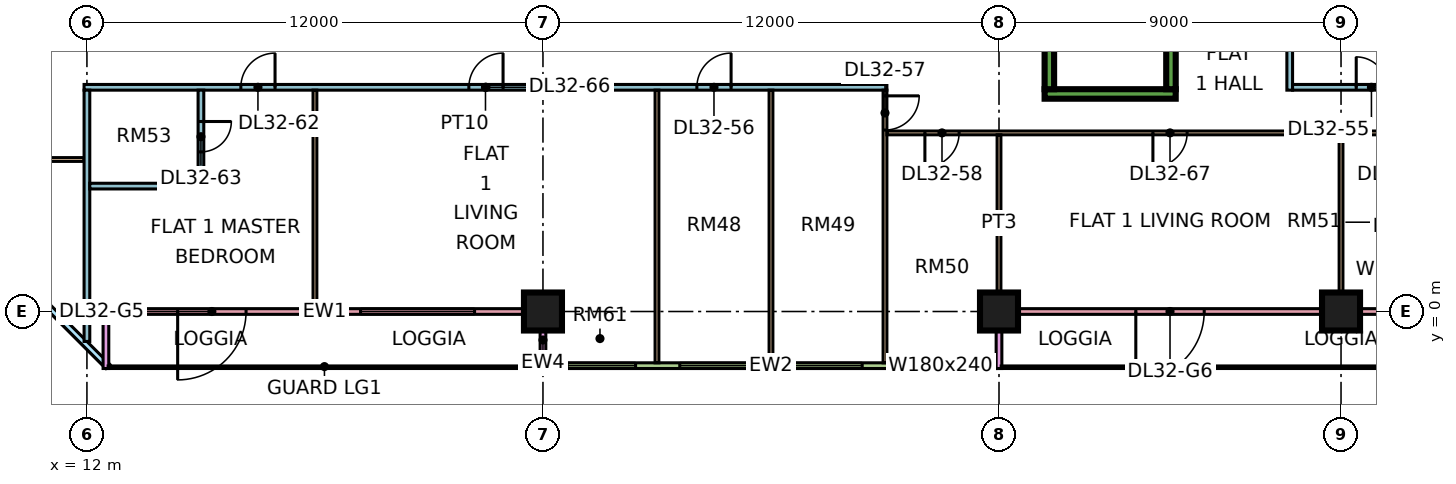
"""IFC4 building model, lengths in metres.
Left out: names, types, materials, properties, quantities, classifications, styles, units other than length and angle.
Written with IfcOpenShell. Run it as: python <this file> out.ifc"""

import sys

from ifc_helpers import new_model, si_unit, direction, frame, frame_2d, origin, origin_2d, place, context, subcontext, project, spatial, rectangle, extrude, element, fill, save


model = new_model("IFC4")
c1 = context("Model", 3, precision=1e-05, world=origin(), true_north=direction((0.0, 1.0)))
c2 = subcontext(c1, "Body", "Model", "MODEL_VIEW")
j1 = project(units=[si_unit("LENGTHUNIT", "METRE"), si_unit("PLANEANGLEUNIT", "RADIAN")], contexts=[c1])
p1 = place(None, origin())
s1 = spatial("IfcSite", under=j1, at=p1, CompositionType="ELEMENT")
p2 = place(p1, origin())
s2 = spatial("IfcBuilding", under=s1, at=p2, CompositionType="ELEMENT")
p3 = place(p2, frame((0.0, 0.0, 136.9)))
s3 = spatial("IfcBuildingStorey", under=s2, at=p3, CompositionType="ELEMENT", Elevation=136.9)
for number, where, z_axis, x_axis in (
    (1, (24.0, 0.0, 0.0), (0.0, 0.0, 1.0), (1.0, 0.0, 0.0)),
    (2, (36.0, 0.0, 0.0), (0.0, 0.0, 1.0), (1.0, 0.0, 0.0)),
    (3, (45.0, 0.0, 0.0), (0.0, 0.0, 1.0), (1.0, 0.0, 0.0)),
):
    element("IfcColumn", number, at=place(p3, frame(where, z_axis=z_axis, x_axis=x_axis)), inside=s3, PredefinedType="COLUMN", context=c2, shape_type="SweptSolid", body=[
        extrude(rectangle(XDim=1.0, YDim=1.0, at=origin_2d()), origin(), (0.0, 0.0, 1.0), 3.75),
    ])
p4 = place(p3, frame((37.2, 5.725, 0.0), z_axis=(0.0, 0.0, 1.0), x_axis=(1.0, 0.0, 0.0)))
e4 = element("IfcWall", 4, at=p4, inside=s3, PredefinedType="SHEAR", context=c2, shape_type="SweptSolid", body=[
    extrude(rectangle(XDim=3.45, YDim=0.25, at=frame_2d((1.725, 0.0))), origin(), (0.0, 0.0, 1.0), 3.75),
])
for number, where, z_axis, x_axis in (
    (5, (37.325, 5.85, 0.0), (0.0, 0.0, 1.0), (0.0, 1.0, 0.0)),
    (6, (40.525, 5.85, 0.0), (0.0, 0.0, 1.0), (0.0, 1.0, 0.0)),
):
    element("IfcWall", number, at=place(p3, frame(where, z_axis=z_axis, x_axis=x_axis)), inside=s3, PredefinedType="SHEAR", context=c2, shape_type="SweptSolid", body=[
        extrude(rectangle(XDim=6.5, YDim=0.25, at=frame_2d((3.25, 0.0))), origin(), (0.0, 0.0, 1.0), 3.75),
    ])
p5 = place(p3, frame((-1.447, 12.553, 0.0), z_axis=(0.0, 0.0, 1.0), x_axis=(0.707106781187, -0.707106781187, 0.0)))
e7 = element("IfcWall", 7, at=p5, inside=s3, PredefinedType="SOLIDWALL", context=c2, shape_type="SweptSolid", body=[
    extrude(rectangle(XDim=19.799, YDim=0.15, at=frame_2d((9.899, 0.0))), origin(), (0.0, 0.0, 1.0), 3.3),
])
p6 = place(p5, frame((2.212, 0.0, 0.45)))
e8 = element("IfcOpeningElement", 8, at=p6, cuts=e7, PredefinedType="OPENING", context=c2, shape_type="SweptSolid", body=[
    extrude(rectangle(XDim=3.0, YDim=2.4, at=frame_2d((1.5, 1.2))), frame((0.0, 0.085, 0.0), z_axis=(0.0, -1.0, 0.0), x_axis=(1.0, 0.0, 0.0)), (0.0, 0.0, 1.0), 0.17),
])
p7 = place(p5, frame((10.216, 0.0, 0.45)))
e9 = element("IfcOpeningElement", 9, at=p7, cuts=e7, PredefinedType="OPENING", context=c2, shape_type="SweptSolid", body=[
    extrude(rectangle(XDim=3.0, YDim=2.4, at=frame_2d((1.5, 1.2))), frame((0.0, 0.085, 0.0), z_axis=(0.0, -1.0, 0.0), x_axis=(1.0, 0.0, 0.0)), (0.0, 0.0, 1.0), 0.17),
])
p8 = place(p3, frame((12.575, 0.0, 0.0), z_axis=(0.0, 0.0, 1.0), x_axis=(1.0, 0.0, 0.0)))
e10 = element("IfcWall", 10, at=p8, inside=s3, PredefinedType="SOLIDWALL", context=c2, shape_type="SweptSolid", body=[
    extrude(rectangle(XDim=11.35, YDim=0.15, at=frame_2d((5.675, 0.0))), origin(), (0.0, 0.0, 1.0), 3.3),
])
p9 = place(p8, frame((1.812, 0.0, 0.0)))
e11 = element("IfcOpeningElement", 11, at=p9, cuts=e10, PredefinedType="OPENING", context=c2, shape_type="SweptSolid", body=[
    extrude(rectangle(XDim=1.8, YDim=2.4, at=frame_2d((0.9, 1.2))), frame((0.0, 0.085, 0.0), z_axis=(0.0, -1.0, 0.0), x_axis=(1.0, 0.0, 0.0)), (0.0, 0.0, 1.0), 0.17),
])
p10 = place(p8, frame((6.625, 0.0, 0.45)))
e12 = element("IfcOpeningElement", 12, at=p10, cuts=e10, PredefinedType="OPENING", context=c2, shape_type="SweptSolid", body=[
    extrude(rectangle(XDim=3.0, YDim=2.4, at=frame_2d((1.5, 1.2))), frame((0.0, 0.085, 0.0), z_axis=(0.0, -1.0, 0.0), x_axis=(1.0, 0.0, 0.0)), (0.0, 0.0, 1.0), 0.17),
])
for number, where, z_axis, x_axis in (
    (13, (12.5, -1.5, 0.0), (0.0, 0.0, 1.0), (0.0, 1.0, 0.0)),
    (14, (24.0, -1.5, 0.0), (0.0, 0.0, 1.0), (0.0, 1.0, 0.0)),
):
    element("IfcWall", number, at=place(p3, frame(where, z_axis=z_axis, x_axis=x_axis)), inside=s3, PredefinedType="SOLIDWALL", context=c2, shape_type="SweptSolid", body=[
        extrude(rectangle(XDim=1.5, YDim=0.15, at=frame_2d((0.75, 0.0))), origin(), (0.0, 0.0, 1.0), 3.3),
    ])
p11 = place(p3, frame((24.075, -1.425, 0.0), z_axis=(0.0, 0.0, 1.0), x_axis=(1.0, 0.0, 0.0)))
e15 = element("IfcWall", 15, at=p11, inside=s3, PredefinedType="SOLIDWALL", context=c2, shape_type="SweptSolid", body=[
    extrude(rectangle(XDim=11.85, YDim=0.15, at=frame_2d((5.925, 0.0))), origin(), (0.0, 0.0, 1.0), 3.3),
])
p12 = place(p11, frame((0.562, 0.0, 0.45)))
e16 = element("IfcOpeningElement", 16, at=p12, cuts=e15, PredefinedType="OPENING", context=c2, shape_type="SweptSolid", body=[
    extrude(rectangle(XDim=1.8, YDim=2.4, at=frame_2d((0.9, 1.2))), frame((0.0, 0.085, 0.0), z_axis=(0.0, -1.0, 0.0), x_axis=(1.0, 0.0, 0.0)), (0.0, 0.0, 1.0), 0.17),
])
p13 = place(p11, frame((3.525, 0.0, 0.45)))
e17 = element("IfcOpeningElement", 17, at=p13, cuts=e15, PredefinedType="OPENING", context=c2, shape_type="SweptSolid", body=[
    extrude(rectangle(XDim=1.8, YDim=2.4, at=frame_2d((0.9, 1.2))), frame((0.0, 0.085, 0.0), z_axis=(0.0, -1.0, 0.0), x_axis=(1.0, 0.0, 0.0)), (0.0, 0.0, 1.0), 0.17),
])
p14 = place(p11, frame((6.525, 0.0, 0.45)))
e18 = element("IfcOpeningElement", 18, at=p14, cuts=e15, PredefinedType="OPENING", context=c2, shape_type="SweptSolid", body=[
    extrude(rectangle(XDim=1.8, YDim=2.4, at=frame_2d((0.9, 1.2))), frame((0.0, 0.085, 0.0), z_axis=(0.0, -1.0, 0.0), x_axis=(1.0, 0.0, 0.0)), (0.0, 0.0, 1.0), 0.17),
])
p15 = place(p11, frame((9.488, 0.0, 0.45)))
e19 = element("IfcOpeningElement", 19, at=p15, cuts=e15, PredefinedType="OPENING", context=c2, shape_type="SweptSolid", body=[
    extrude(rectangle(XDim=1.8, YDim=2.4, at=frame_2d((0.9, 1.2))), frame((0.0, 0.085, 0.0), z_axis=(0.0, -1.0, 0.0), x_axis=(1.0, 0.0, 0.0)), (0.0, 0.0, 1.0), 0.17),
])
p16 = place(p3, frame((36.075, 0.0, 0.0), z_axis=(0.0, 0.0, 1.0), x_axis=(1.0, 0.0, 0.0)))
e20 = element("IfcWall", 20, at=p16, inside=s3, PredefinedType="SOLIDWALL", context=c2, shape_type="SweptSolid", body=[
    extrude(rectangle(XDim=11.85, YDim=0.15, at=frame_2d((5.925, 0.0))), origin(), (0.0, 0.0, 1.0), 3.3),
])
p17 = place(p16, frame((3.525, 0.0, 0.0)))
e21 = element("IfcOpeningElement", 21, at=p17, cuts=e20, PredefinedType="OPENING", context=c2, shape_type="SweptSolid", body=[
    extrude(rectangle(XDim=1.8, YDim=2.4, at=frame_2d((0.9, 1.2))), frame((0.0, 0.085, 0.0), z_axis=(0.0, -1.0, 0.0), x_axis=(1.0, 0.0, 0.0)), (0.0, 0.0, 1.0), 0.17),
])
p18 = place(p16, frame((10.087, 0.0, 0.45)))
e22 = element("IfcOpeningElement", 22, at=p18, cuts=e20, PredefinedType="OPENING", context=c2, shape_type="SweptSolid", body=[
    extrude(rectangle(XDim=1.2, YDim=2.4, at=frame_2d((0.6, 1.2))), frame((0.0, 0.085, 0.0), z_axis=(0.0, -1.0, 0.0), x_axis=(1.0, 0.0, 0.0)), (0.0, 0.0, 1.0), 0.17),
])
p19 = place(p3, frame((36.0, -1.5, 0.0), z_axis=(0.0, 0.0, 1.0), x_axis=(0.0, 1.0, 0.0)))
e23 = element("IfcWall", 23, at=p19, inside=s3, PredefinedType="SOLIDWALL", context=c2, shape_type="SweptSolid", body=[
    extrude(rectangle(XDim=1.5, YDim=0.15, at=frame_2d((0.75, 0.0))), origin(), (0.0, 0.0, 1.0), 3.3),
])
p20 = place(p3, frame((9.05, 4.0, 0.0), z_axis=(0.0, 0.0, 1.0), x_axis=(1.0, 0.0, 0.0)))
e24 = element("IfcWall", 24, at=p20, inside=s3, PredefinedType="PARTITIONING", context=c2, shape_type="SweptSolid", body=[
    extrude(rectangle(XDim=2.875, YDim=0.1, at=frame_2d((1.438, 0.0))), origin(), (0.0, 0.0, 1.0), 3.3),
])
p21 = place(p3, frame((11.925, 5.9, 0.0), z_axis=(0.0, 0.0, 1.0), x_axis=(1.0, 0.0, 0.0)))
e25 = element("IfcWall", 25, at=p21, inside=s3, PredefinedType="PARTITIONING", context=c2, shape_type="SweptSolid", body=[
    extrude(rectangle(XDim=21.125, YDim=0.15, at=frame_2d((10.562, 0.0))), origin(), (0.0, 0.0, 1.0), 3.3),
])
p22 = place(p21, frame((16.125, 0.0, 0.0)))
e26 = element("IfcOpeningElement", 26, at=p22, cuts=e25, PredefinedType="OPENING", context=c2, shape_type="SweptSolid", body=[
    extrude(rectangle(XDim=0.9, YDim=2.1, at=frame_2d((0.45, 1.05))), frame((0.0, 0.085, 0.0), z_axis=(0.0, -1.0, 0.0), x_axis=(1.0, 0.0, 0.0)), (0.0, 0.0, 1.0), 0.17),
])
p23 = place(p21, frame((4.125, 0.0, 0.0)))
e27 = element("IfcOpeningElement", 27, at=p23, cuts=e25, PredefinedType="OPENING", context=c2, shape_type="SweptSolid", body=[
    extrude(rectangle(XDim=0.9, YDim=2.1, at=frame_2d((0.45, 1.05))), frame((0.0, 0.085, 0.0), z_axis=(0.0, -1.0, 0.0), x_axis=(1.0, 0.0, 0.0)), (0.0, 0.0, 1.0), 0.17),
])
p24 = place(p21, frame((10.125, 0.0, 0.0)))
e28 = element("IfcOpeningElement", 28, at=p24, cuts=e25, PredefinedType="OPENING", context=c2, shape_type="SweptSolid", body=[
    extrude(rectangle(XDim=0.9, YDim=2.1, at=frame_2d((0.45, 1.05))), frame((0.0, 0.085, 0.0), z_axis=(0.0, -1.0, 0.0), x_axis=(1.0, 0.0, 0.0)), (0.0, 0.0, 1.0), 0.17),
])
p25 = place(p3, frame((12.0, -0.788, 0.0), z_axis=(0.0, 0.0, 1.0), x_axis=(0.0, 1.0, 0.0)))
e29 = element("IfcWall", 29, at=p25, inside=s3, PredefinedType="PARTITIONING", context=c2, shape_type="SweptSolid", body=[
    extrude(rectangle(XDim=6.613, YDim=0.15, at=frame_2d((3.306, 0.0))), origin(), (0.0, 0.0, 1.0), 3.3),
])
p26 = place(p3, frame((12.075, 3.3, 0.0), z_axis=(0.0, 0.0, 1.0), x_axis=(1.0, 0.0, 0.0)))
e30 = element("IfcWall", 30, at=p26, inside=s3, PredefinedType="PARTITIONING", context=c2, shape_type="SweptSolid", body=[
    extrude(rectangle(XDim=3.0, YDim=0.15, at=frame_2d((1.5, 0.0))), origin(), (0.0, 0.0, 1.0), 3.3),
])
p27 = place(p3, frame((15.0, 3.375, 0.0), z_axis=(0.0, 0.0, 1.0), x_axis=(0.0, 1.0, 0.0)))
e31 = element("IfcWall", 31, at=p27, inside=s3, PredefinedType="PARTITIONING", context=c2, shape_type="SweptSolid", body=[
    extrude(rectangle(XDim=2.45, YDim=0.15, at=frame_2d((1.225, 0.0))), origin(), (0.0, 0.0, 1.0), 3.3),
])
p28 = place(p27, frame((0.825, 0.0, 0.0)))
e32 = element("IfcOpeningElement", 32, at=p28, cuts=e31, PredefinedType="OPENING", context=c2, shape_type="SweptSolid", body=[
    extrude(rectangle(XDim=0.8, YDim=2.1, at=frame_2d((0.4, 1.05))), frame((0.0, 0.085, 0.0), z_axis=(0.0, -1.0, 0.0), x_axis=(1.0, 0.0, 0.0)), (0.0, 0.0, 1.0), 0.17),
])
p29 = place(p3, frame((18.0, 0.074, 0.0), z_axis=(0.0, 0.0, 1.0), x_axis=(0.0, 1.0, 0.0)))
e33 = element("IfcWall", 33, at=p29, inside=s3, PredefinedType="PARTITIONING", context=c2, shape_type="SweptSolid", body=[
    extrude(rectangle(XDim=5.751, YDim=0.1, at=frame_2d((2.875, 0.0))), origin(), (0.0, 0.0, 1.0), 3.3),
])
p30 = place(p3, frame((27.0, -1.35, 0.0), z_axis=(0.0, 0.0, 1.0), x_axis=(0.0, 1.0, 0.0)))
e34 = element("IfcWall", 34, at=p30, inside=s3, PredefinedType="PARTITIONING", context=c2, shape_type="SweptSolid", body=[
    extrude(rectangle(XDim=7.175, YDim=0.1, at=frame_2d((3.587, 0.0))), origin(), (0.0, 0.0, 1.0), 3.3),
])
p31 = place(p3, frame((30.0, -1.351, 0.0), z_axis=(0.0, 0.0, 1.0), x_axis=(0.0, 1.0, 0.0)))
e35 = element("IfcWall", 35, at=p31, inside=s3, PredefinedType="PARTITIONING", context=c2, shape_type="SweptSolid", body=[
    extrude(rectangle(XDim=7.176, YDim=0.1, at=frame_2d((3.588, 0.0))), origin(), (0.0, 0.0, 1.0), 3.3),
])
p32 = place(p3, frame((33.0, -1.351, 0.0), z_axis=(0.0, 0.0, 1.0), x_axis=(0.0, 1.0, 0.0)))
e36 = element("IfcWall", 36, at=p32, inside=s3, PredefinedType="PARTITIONING", context=c2, shape_type="SweptSolid", body=[
    extrude(rectangle(XDim=7.176, YDim=0.1, at=frame_2d((3.588, 0.0))), origin(), (0.0, 0.0, 1.0), 3.3),
])
p33 = place(p32, frame((6.126, 0.0, 0.0)))
e37 = element("IfcOpeningElement", 37, at=p33, cuts=e36, PredefinedType="OPENING", context=c2, shape_type="SweptSolid", body=[
    extrude(rectangle(XDim=0.9, YDim=2.1, at=frame_2d((0.45, 1.05))), frame((0.0, 0.06, 0.0), z_axis=(0.0, -1.0, 0.0), x_axis=(1.0, 0.0, 0.0)), (0.0, 0.0, 1.0), 0.12),
])
p34 = place(p3, frame((33.05, 4.7, 0.0), z_axis=(0.0, 0.0, 1.0), x_axis=(1.0, 0.0, 0.0)))
e38 = element("IfcWall", 38, at=p34, inside=s3, PredefinedType="PARTITIONING", context=c2, shape_type="SweptSolid", body=[
    extrude(rectangle(XDim=14.85, YDim=0.1, at=frame_2d((7.425, 0.0))), origin(), (0.0, 0.0, 1.0), 3.3),
])
p35 = place(p34, frame((1.0, 0.0, 0.0)))
e39 = element("IfcOpeningElement", 39, at=p35, cuts=e38, PredefinedType="OPENING", context=c2, shape_type="SweptSolid", body=[
    extrude(rectangle(XDim=0.9, YDim=2.1, at=frame_2d((0.45, 1.05))), frame((0.0, 0.06, 0.0), z_axis=(0.0, -1.0, 0.0), x_axis=(1.0, 0.0, 0.0)), (0.0, 0.0, 1.0), 0.12),
])
p36 = place(p34, frame((13.0, 0.0, 0.0)))
e40 = element("IfcOpeningElement", 40, at=p36, cuts=e38, PredefinedType="OPENING", context=c2, shape_type="SweptSolid", body=[
    extrude(rectangle(XDim=0.9, YDim=2.1, at=frame_2d((0.45, 1.05))), frame((0.0, 0.06, 0.0), z_axis=(0.0, -1.0, 0.0), x_axis=(1.0, 0.0, 0.0)), (0.0, 0.0, 1.0), 0.12),
])
p37 = place(p34, frame((7.0, 0.0, 0.0)))
e41 = element("IfcOpeningElement", 41, at=p37, cuts=e38, PredefinedType="OPENING", context=c2, shape_type="SweptSolid", body=[
    extrude(rectangle(XDim=0.9, YDim=2.1, at=frame_2d((0.45, 1.05))), frame((0.0, 0.06, 0.0), z_axis=(0.0, -1.0, 0.0), x_axis=(1.0, 0.0, 0.0)), (0.0, 0.0, 1.0), 0.12),
])
p38 = place(p3, frame((36.0, 0.0, 0.0), z_axis=(0.0, 0.0, 1.0), x_axis=(0.0, 1.0, 0.0)))
e42 = element("IfcWall", 42, at=p38, inside=s3, PredefinedType="PARTITIONING", context=c2, shape_type="SweptSolid", body=[
    extrude(rectangle(XDim=4.65, YDim=0.1, at=frame_2d((2.325, 0.0))), origin(), (0.0, 0.0, 1.0), 3.3),
])
p39 = place(p3, frame((43.65, 5.825, 0.0), z_axis=(0.0, 0.0, 1.0), x_axis=(0.0, 1.0, 0.0)))
e43 = element("IfcWall", 43, at=p39, inside=s3, PredefinedType="PARTITIONING", context=c2, shape_type="SweptSolid", body=[
    extrude(rectangle(XDim=6.575, YDim=0.15, at=frame_2d((3.288, 0.0))), origin(), (0.0, 0.0, 1.0), 3.3),
])
p40 = place(p39, frame((4.425, 0.0, 0.0)))
e44 = element("IfcOpeningElement", 44, at=p40, cuts=e43, PredefinedType="OPENING", context=c2, shape_type="SweptSolid", body=[
    extrude(rectangle(XDim=0.9, YDim=2.1, at=frame_2d((0.45, 1.05))), frame((0.0, 0.085, 0.0), z_axis=(0.0, -1.0, 0.0), x_axis=(1.0, 0.0, 0.0)), (0.0, 0.0, 1.0), 0.17),
])
p41 = place(p3, frame((43.725, 5.9, 0.0), z_axis=(0.0, 0.0, 1.0), x_axis=(1.0, 0.0, 0.0)))
e45 = element("IfcWall", 45, at=p41, inside=s3, PredefinedType="PARTITIONING", context=c2, shape_type="SweptSolid", body=[
    extrude(rectangle(XDim=4.175, YDim=0.15, at=frame_2d((2.087, 0.0))), origin(), (0.0, 0.0, 1.0), 3.3),
])
p42 = place(p41, frame((1.675, 0.0, 0.0)))
e46 = element("IfcOpeningElement", 46, at=p42, cuts=e45, PredefinedType="OPENING", context=c2, shape_type="SweptSolid", body=[
    extrude(rectangle(XDim=0.8, YDim=2.1, at=frame_2d((0.4, 1.05))), frame((0.0, 0.085, 0.0), z_axis=(0.0, -1.0, 0.0), x_axis=(1.0, 0.0, 0.0)), (0.0, 0.0, 1.0), 0.17),
])
p43 = place(p3, frame((45.0, 0.074, 0.0), z_axis=(0.0, 0.0, 1.0), x_axis=(0.0, 1.0, 0.0)))
e47 = element("IfcWall", 47, at=p43, inside=s3, PredefinedType="PARTITIONING", context=c2, shape_type="SweptSolid", body=[
    extrude(rectangle(XDim=4.576, YDim=0.1, at=frame_2d((2.288, 0.0))), origin(), (0.0, 0.0, 1.0), 3.3),
])
p44 = place(p9, frame((1.8, 0.0, 0.0), z_axis=(0.0, 0.0, 1.0), x_axis=(-1.0, 0.0, 0.0)))
e48 = element("IfcDoor", 48, at=p44, inside=s3, OperationType="DOUBLE_DOOR_SINGLE_SWING", PredefinedType="DOOR", context=c2, shape_type="SweptSolid", body=[
    extrude(rectangle(XDim=1.8, YDim=2.4, at=frame_2d((0.9, 1.2))), frame((0.0, 0.025, 0.0), z_axis=(0.0, -1.0, 0.0), x_axis=(1.0, 0.0, 0.0)), (0.0, 0.0, 1.0), 0.05),
])
fill(e11, e48)
p45 = place(p10, origin())
e49 = element("IfcWindow", 49, at=p45, inside=s3, PartitioningType="SINGLE_PANEL", PredefinedType="WINDOW", context=c2, shape_type="SweptSolid", body=[
    extrude(rectangle(XDim=3.0, YDim=2.4, at=frame_2d((1.5, 1.2))), frame((0.0, 0.03, 0.0), z_axis=(0.0, -1.0, 0.0), x_axis=(1.0, 0.0, 0.0)), (0.0, 0.0, 1.0), 0.06),
])
fill(e12, e49)
p46 = place(p12, origin())
e50 = element("IfcWindow", 50, at=p46, inside=s3, PartitioningType="SINGLE_PANEL", PredefinedType="WINDOW", context=c2, shape_type="SweptSolid", body=[
    extrude(rectangle(XDim=1.8, YDim=2.4, at=frame_2d((0.9, 1.2))), frame((0.0, 0.03, 0.0), z_axis=(0.0, -1.0, 0.0), x_axis=(1.0, 0.0, 0.0)), (0.0, 0.0, 1.0), 0.06),
])
fill(e16, e50)
p47 = place(p13, origin())
e51 = element("IfcWindow", 51, at=p47, inside=s3, PartitioningType="SINGLE_PANEL", PredefinedType="WINDOW", context=c2, shape_type="SweptSolid", body=[
    extrude(rectangle(XDim=1.8, YDim=2.4, at=frame_2d((0.9, 1.2))), frame((0.0, 0.03, 0.0), z_axis=(0.0, -1.0, 0.0), x_axis=(1.0, 0.0, 0.0)), (0.0, 0.0, 1.0), 0.06),
])
fill(e17, e51)
p48 = place(p14, origin())
e52 = element("IfcWindow", 52, at=p48, inside=s3, PartitioningType="SINGLE_PANEL", PredefinedType="WINDOW", context=c2, shape_type="SweptSolid", body=[
    extrude(rectangle(XDim=1.8, YDim=2.4, at=frame_2d((0.9, 1.2))), frame((0.0, 0.03, 0.0), z_axis=(0.0, -1.0, 0.0), x_axis=(1.0, 0.0, 0.0)), (0.0, 0.0, 1.0), 0.06),
])
fill(e18, e52)
p49 = place(p15, origin())
e53 = element("IfcWindow", 53, at=p49, inside=s3, PartitioningType="SINGLE_PANEL", PredefinedType="WINDOW", context=c2, shape_type="SweptSolid", body=[
    extrude(rectangle(XDim=1.8, YDim=2.4, at=frame_2d((0.9, 1.2))), frame((0.0, 0.03, 0.0), z_axis=(0.0, -1.0, 0.0), x_axis=(1.0, 0.0, 0.0)), (0.0, 0.0, 1.0), 0.06),
])
fill(e19, e53)
p50 = place(p17, frame((1.8, 0.0, 0.0), z_axis=(0.0, 0.0, 1.0), x_axis=(-1.0, 0.0, 0.0)))
e54 = element("IfcDoor", 54, at=p50, inside=s3, OperationType="DOUBLE_DOOR_SINGLE_SWING", PredefinedType="DOOR", context=c2, shape_type="SweptSolid", body=[
    extrude(rectangle(XDim=1.8, YDim=2.4, at=frame_2d((0.9, 1.2))), frame((0.0, 0.025, 0.0), z_axis=(0.0, -1.0, 0.0), x_axis=(1.0, 0.0, 0.0)), (0.0, 0.0, 1.0), 0.05),
])
fill(e21, e54)
p51 = place(p42, origin())
e55 = element("IfcDoor", 55, at=p51, inside=s3, OperationType="SINGLE_SWING_LEFT", PredefinedType="DOOR", context=c2, shape_type="SweptSolid", body=[
    extrude(rectangle(XDim=0.8, YDim=2.1, at=frame_2d((0.4, 1.05))), frame((0.0, 0.025, 0.0), z_axis=(0.0, -1.0, 0.0), x_axis=(1.0, 0.0, 0.0)), (0.0, 0.0, 1.0), 0.05),
])
fill(e46, e55)
p52 = place(p22, frame((0.9, 0.0, 0.0), z_axis=(0.0, 0.0, 1.0), x_axis=(-1.0, 0.0, 0.0)))
e56 = element("IfcDoor", 56, at=p52, inside=s3, OperationType="SINGLE_SWING_RIGHT", PredefinedType="DOOR", context=c2, shape_type="SweptSolid", body=[
    extrude(rectangle(XDim=0.9, YDim=2.1, at=frame_2d((0.45, 1.05))), frame((0.0, 0.025, 0.0), z_axis=(0.0, -1.0, 0.0), x_axis=(1.0, 0.0, 0.0)), (0.0, 0.0, 1.0), 0.05),
])
fill(e26, e56)
p53 = place(p33, origin())
e57 = element("IfcDoor", 57, at=p53, inside=s3, OperationType="SINGLE_SWING_RIGHT", PredefinedType="DOOR", context=c2, shape_type="SweptSolid", body=[
    extrude(rectangle(XDim=0.9, YDim=2.1, at=frame_2d((0.45, 1.05))), frame((0.0, 0.025, 0.0), z_axis=(0.0, -1.0, 0.0), x_axis=(1.0, 0.0, 0.0)), (0.0, 0.0, 1.0), 0.05),
])
fill(e37, e57)
p54 = place(p35, frame((0.9, 0.0, 0.0), z_axis=(0.0, 0.0, 1.0), x_axis=(-1.0, 0.0, 0.0)))
e58 = element("IfcDoor", 58, at=p54, inside=s3, OperationType="SINGLE_SWING_LEFT", PredefinedType="DOOR", context=c2, shape_type="SweptSolid", body=[
    extrude(rectangle(XDim=0.9, YDim=2.1, at=frame_2d((0.45, 1.05))), frame((0.0, 0.025, 0.0), z_axis=(0.0, -1.0, 0.0), x_axis=(1.0, 0.0, 0.0)), (0.0, 0.0, 1.0), 0.05),
])
fill(e39, e58)
p55 = place(p23, frame((0.9, 0.0, 0.0), z_axis=(0.0, 0.0, 1.0), x_axis=(-1.0, 0.0, 0.0)))
e59 = element("IfcDoor", 59, at=p55, inside=s3, OperationType="SINGLE_SWING_RIGHT", PredefinedType="DOOR", context=c2, shape_type="SweptSolid", body=[
    extrude(rectangle(XDim=0.9, YDim=2.1, at=frame_2d((0.45, 1.05))), frame((0.0, 0.025, 0.0), z_axis=(0.0, -1.0, 0.0), x_axis=(1.0, 0.0, 0.0)), (0.0, 0.0, 1.0), 0.05),
])
fill(e27, e59)
p56 = place(p28, origin())
e60 = element("IfcDoor", 60, at=p56, inside=s3, OperationType="SINGLE_SWING_RIGHT", PredefinedType="DOOR", context=c2, shape_type="SweptSolid", body=[
    extrude(rectangle(XDim=0.8, YDim=2.1, at=frame_2d((0.4, 1.05))), frame((0.0, 0.025, 0.0), z_axis=(0.0, -1.0, 0.0), x_axis=(1.0, 0.0, 0.0)), (0.0, 0.0, 1.0), 0.05),
])
fill(e32, e60)
p57 = place(p24, frame((0.9, 0.0, 0.0), z_axis=(0.0, 0.0, 1.0), x_axis=(-1.0, 0.0, 0.0)))
e61 = element("IfcDoor", 61, at=p57, inside=s3, OperationType="SINGLE_SWING_RIGHT", PredefinedType="DOOR", context=c2, shape_type="SweptSolid", body=[
    extrude(rectangle(XDim=0.9, YDim=2.1, at=frame_2d((0.45, 1.05))), frame((0.0, 0.025, 0.0), z_axis=(0.0, -1.0, 0.0), x_axis=(1.0, 0.0, 0.0)), (0.0, 0.0, 1.0), 0.05),
])
fill(e28, e61)
p58 = place(p37, frame((0.9, 0.0, 0.0), z_axis=(0.0, 0.0, 1.0), x_axis=(-1.0, 0.0, 0.0)))
e62 = element("IfcDoor", 62, at=p58, inside=s3, OperationType="SINGLE_SWING_LEFT", PredefinedType="DOOR", context=c2, shape_type="SweptSolid", body=[
    extrude(rectangle(XDim=0.9, YDim=2.1, at=frame_2d((0.45, 1.05))), frame((0.0, 0.025, 0.0), z_axis=(0.0, -1.0, 0.0), x_axis=(1.0, 0.0, 0.0)), (0.0, 0.0, 1.0), 0.05),
])
fill(e41, e62)
save(model, sys.argv[1])
